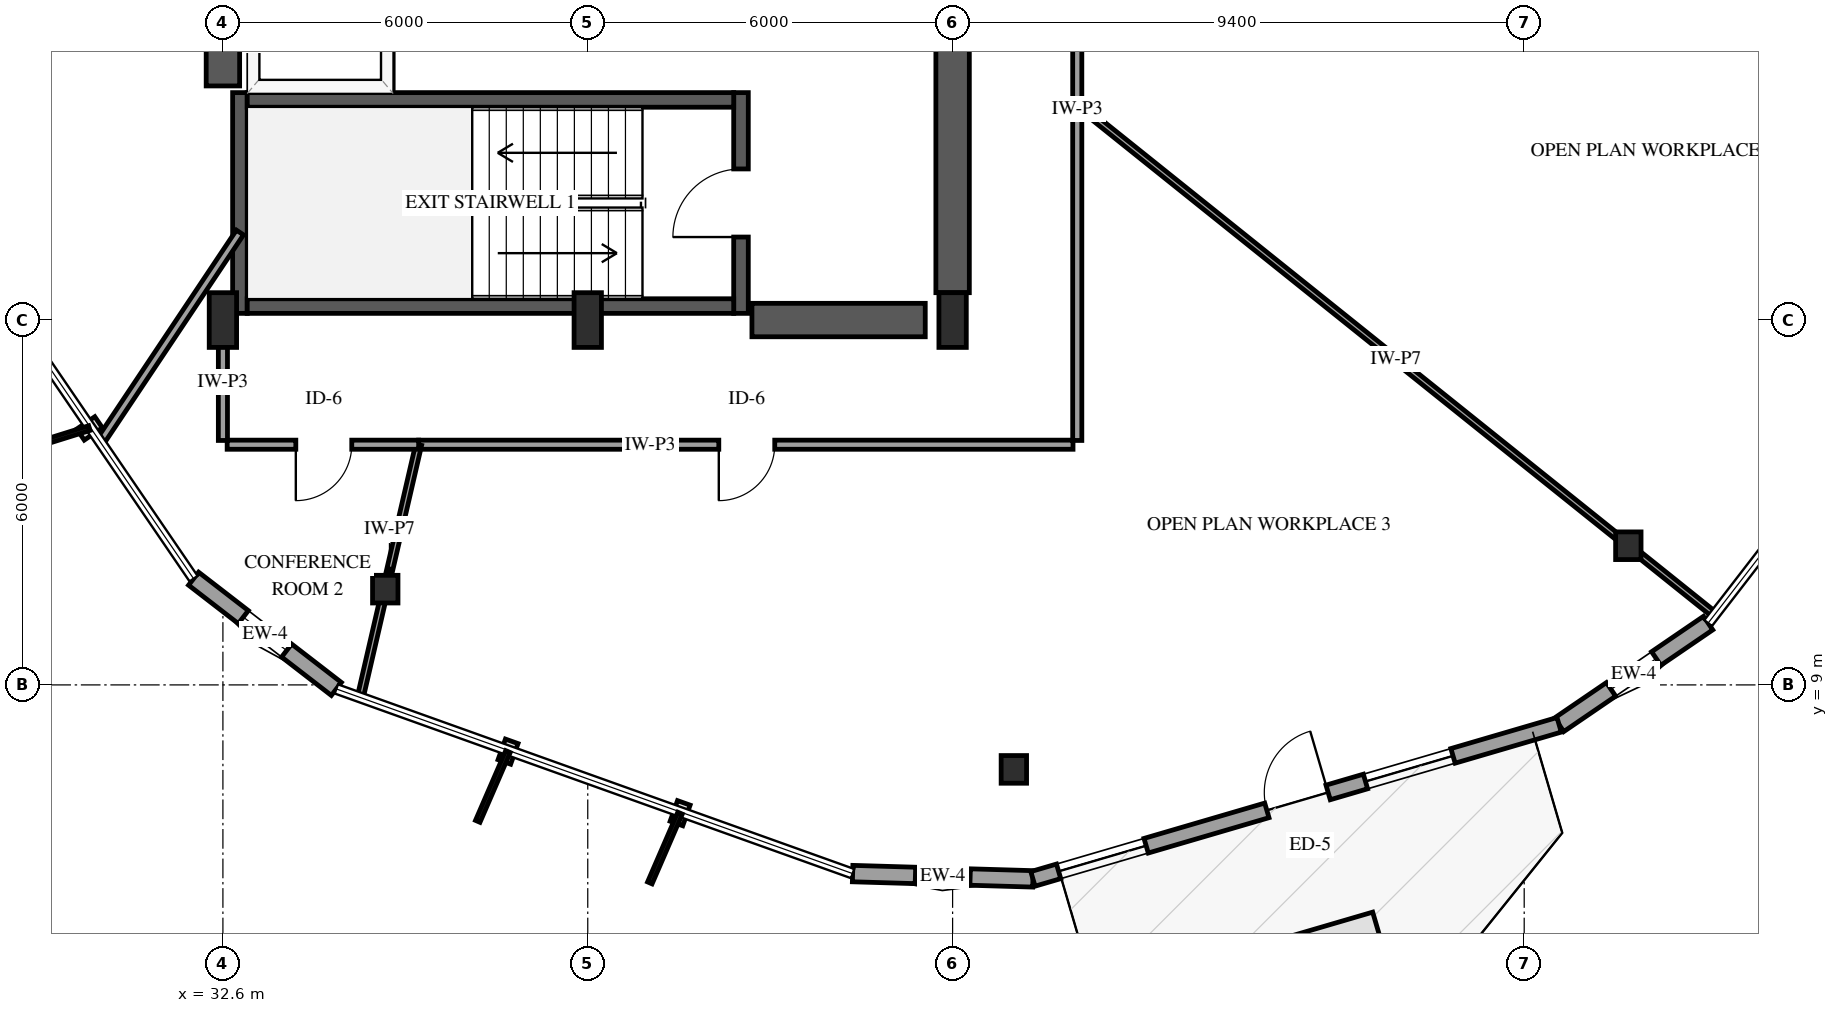
"""IFC4 building model, lengths in metres.
Left out: names, types, materials, properties, quantities, classifications, styles, units other than length and angle.
Written with IfcOpenShell. Run it as: python <this file> out.ifc"""

import sys

from ifc_helpers import new_model, si_unit, direction, frame, frame_2d, origin, origin_2d, place, context, subcontext, project, spatial, rectangle, i_section, extrude, element, fill, save


model = new_model("IFC4")
c1 = context("Model", 3, precision=1e-05, world=origin(), true_north=direction((0.0, 1.0)))
c2 = subcontext(c1, "Body", "Model", "MODEL_VIEW")
j1 = project(units=[si_unit("LENGTHUNIT", "METRE"), si_unit("PLANEANGLEUNIT", "RADIAN")], contexts=[c1])
p1 = place(None, origin())
s1 = spatial("IfcSite", under=j1, at=p1, CompositionType="ELEMENT")
p2 = place(p1, origin())
s2 = spatial("IfcBuilding", under=s1, at=p2, CompositionType="ELEMENT")
p3 = place(p2, frame((0.0, 0.0, 91.3)))
s3 = spatial("IfcBuildingStorey", under=s2, at=p3, CompositionType="ELEMENT", Elevation=91.3)
p4 = place(p3, frame((32.88, 15.11, 0.0), z_axis=(0.0, 0.0, 1.0), x_axis=(0.0, 1.0, 0.0)))
e1 = element("IfcWall", 1, at=p4, inside=s3, PredefinedType="SHEAR", context=c2, shape_type="SweptSolid", body=[
    extrude(rectangle(XDim=3.63, YDim=0.24, at=frame_2d((1.815, 0.0))), origin(), (0.0, 0.0, 1.0), 3.9),
])
p5 = place(p3, frame((41.12, 15.11, 0.0), z_axis=(0.0, 0.0, 1.0), x_axis=(0.0, 1.0, 0.0)))
e2 = element("IfcWall", 2, at=p5, inside=s3, PredefinedType="SHEAR", context=c2, shape_type="SweptSolid", body=[
    extrude(rectangle(XDim=3.63, YDim=0.24, at=frame_2d((1.815, 0.0))), origin(), (0.0, 0.0, 1.0), 3.9),
])
p6 = place(p5, frame((1.255, 0.0, 0.0)))
e3 = element("IfcOpeningElement", 3, at=p6, cuts=e2, PredefinedType="OPENING", context=c2, shape_type="SweptSolid", body=[
    extrude(rectangle(XDim=1.12, YDim=2.15, at=frame_2d((0.56, 1.075))), frame((0.0, 0.13, 0.0), z_axis=(0.0, -1.0, 0.0), x_axis=(1.0, 0.0, 0.0)), (0.0, 0.0, 1.0), 0.26),
])
for number, where, z_axis, x_axis in (
    (4, (33.0, 15.23, 0.0), (0.0, 0.0, 1.0), (1.0, 0.0, 0.0)),
    (5, (33.0, 18.62, 0.0), (0.0, 0.0, 1.0), (1.0, 0.0, 0.0)),
):
    element("IfcWall", number, at=place(p3, frame(where, z_axis=z_axis, x_axis=x_axis)), inside=s3, PredefinedType="SHEAR", context=c2, shape_type="SweptSolid", body=[
        extrude(rectangle(XDim=8.0, YDim=0.24, at=frame_2d((4.0, 0.0))), origin(), (0.0, 0.0, 1.0), 3.9),
    ])
p7 = place(p3, frame((32.6, 18.85, 0.0), z_axis=(0.0, 0.0, 1.0), x_axis=(0.0, 1.0, 0.0)))
e6 = element("IfcWall", 6, at=p7, inside=s3, PredefinedType="SHEAR", context=c2, shape_type="SweptSolid", body=[
    extrude(rectangle(XDim=12.3, YDim=0.55, at=frame_2d((6.15, 0.0))), origin(), (0.0, 0.0, 1.0), 3.9),
])
p8 = place(p3, frame((41.3, 15.0, 0.0), z_axis=(0.0, 0.0, 1.0), x_axis=(1.0, 0.0, 0.0)))
e7 = element("IfcWall", 7, at=p8, inside=s3, PredefinedType="SHEAR", context=c2, shape_type="SweptSolid", body=[
    extrude(rectangle(XDim=2.85, YDim=0.55, at=frame_2d((1.425, 0.0))), origin(), (0.0, 0.0, 1.0), 3.9),
])
p9 = place(p3, frame((44.6, 15.45, 0.0), z_axis=(0.0, 0.0, 1.0), x_axis=(0.0, 1.0, 0.0)))
e8 = element("IfcWall", 8, at=p9, inside=s3, PredefinedType="SHEAR", context=c2, shape_type="SweptSolid", body=[
    extrude(rectangle(XDim=6.35, YDim=0.55, at=frame_2d((3.175, 0.0))), origin(), (0.0, 0.0, 1.0), 3.9),
])
for number, where, z_axis, x_axis in (
    (9, (32.6, 15.0, 0.0), (0.0, 0.0, 1.0), (1.0, 0.0, 0.0)),
    (10, (38.6, 15.0, 0.0), (0.0, 0.0, 1.0), (1.0, 0.0, 0.0)),
    (11, (44.6, 15.0, 0.0), (0.0, 0.0, 1.0), (1.0, 0.0, 0.0)),
):
    element("IfcColumn", number, at=place(p3, frame(where, z_axis=z_axis, x_axis=x_axis)), inside=s3, PredefinedType="PILASTER", context=c2, shape_type="SweptSolid", body=[
        extrude(rectangle(XDim=0.45, YDim=0.9, at=origin_2d()), origin(), (0.0, 0.0, 1.0), 3.9),
    ])
for number, where, z_axis, x_axis in (
    (12, (35.27, 10.575, 0.0), (0.0, 0.0, 1.0), (1.0, 0.0, 0.0)),
    (13, (45.607, 7.611, 0.0), (0.0, 0.0, 1.0), (1.0, 0.0, 0.0)),
    (14, (55.712, 11.289, 0.0), (0.0, 0.0, 1.0), (1.0, 0.0, 0.0)),
):
    element("IfcColumn", number, at=place(p3, frame(where, z_axis=z_axis, x_axis=x_axis)), inside=s3, PredefinedType="COLUMN", context=c2, shape_type="SweptSolid", body=[
        extrude(i_section(OverallWidth=0.418, OverallDepth=0.455, WebThickness=0.042, FlangeThickness=0.068, FilletRadius=0.038, at=origin_2d()), origin(), (0.0, 0.0, 1.0), 3.9),
    ])
p10 = place(p3, frame((32.118, 10.747, 0.0), z_axis=(0.0, 0.0, 1.0), x_axis=(0.791417099737, -0.611276512098, 0.0)))
e15 = element("IfcWall", 15, at=p10, inside=s3, PredefinedType="SOLIDWALL", context=c2, shape_type="SweptSolid", body=[
    extrude(rectangle(XDim=2.967, YDim=0.27, at=frame_2d((1.483, 0.0))), origin(), (0.0, 0.0, 1.0), 2.979),
])
p11 = place(p10, frame((1.033, 0.0, 0.75)))
e16 = element("IfcOpeningElement", 16, at=p11, cuts=e15, PredefinedType="OPENING", context=c2, shape_type="SweptSolid", body=[
    extrude(rectangle(XDim=0.9, YDim=1.5, at=frame_2d((0.45, 0.75))), frame((0.0, 0.145, 0.0), z_axis=(0.0, -1.0, 0.0), x_axis=(1.0, 0.0, 0.0)), (0.0, 0.0, 1.0), 0.29),
])
p12 = place(p3, frame((42.956, 5.897, 0.0), z_axis=(0.0, 0.0, 1.0), x_axis=(0.999570736723, -0.029297479193, 0.0)))
e17 = element("IfcWall", 17, at=p12, inside=s3, PredefinedType="SOLIDWALL", context=c2, shape_type="SweptSolid", body=[
    extrude(rectangle(XDim=2.967, YDim=0.27, at=frame_2d((1.483, 0.0))), origin(), (0.0, 0.0, 1.0), 2.979),
])
p13 = place(p12, frame((1.033, 0.0, 0.75)))
e18 = element("IfcOpeningElement", 18, at=p13, cuts=e17, PredefinedType="OPENING", context=c2, shape_type="SweptSolid", body=[
    extrude(rectangle(XDim=0.9, YDim=1.5, at=frame_2d((0.45, 0.75))), frame((0.0, 0.145, 0.0), z_axis=(0.0, -1.0, 0.0), x_axis=(1.0, 0.0, 0.0)), (0.0, 0.0, 1.0), 0.29),
])
p14 = place(p3, frame((54.575, 8.344, 0.0), z_axis=(0.0, 0.0, 1.0), x_axis=(0.825884174717, 0.563839808768, 0.0)))
e19 = element("IfcWall", 19, at=p14, inside=s3, PredefinedType="SOLIDWALL", context=c2, shape_type="SweptSolid", body=[
    extrude(rectangle(XDim=2.967, YDim=0.27, at=frame_2d((1.483, 0.0))), origin(), (0.0, 0.0, 1.0), 2.979),
])
p15 = place(p14, frame((1.033, 0.0, 0.75)))
e20 = element("IfcOpeningElement", 20, at=p15, cuts=e19, PredefinedType="OPENING", context=c2, shape_type="SweptSolid", body=[
    extrude(rectangle(XDim=0.9, YDim=1.5, at=frame_2d((0.45, 0.75))), frame((0.0, 0.145, 0.0), z_axis=(0.0, -1.0, 0.0), x_axis=(1.0, 0.0, 0.0)), (0.0, 0.0, 1.0), 0.29),
])
p16 = place(p3, frame((45.921, 5.81, 0.0), z_axis=(0.0, 0.0, 1.0), x_axis=(0.959709272815, 0.28099486058, 0.0)))
e21 = element("IfcWall", 21, at=p16, inside=s3, PredefinedType="SOLIDWALL", context=c2, shape_type="SweptSolid", body=[
    extrude(rectangle(XDim=9.017, YDim=0.25, at=frame_2d((4.508, 0.0))), origin(), (0.0, 0.0, 1.0), 2.979),
])
p17 = place(p16, frame((4.008, 0.0, 0.0)))
e22 = element("IfcOpeningElement", 22, at=p17, cuts=e21, PredefinedType="OPENING", context=c2, shape_type="SweptSolid", body=[
    extrude(rectangle(XDim=1.05, YDim=2.15, at=frame_2d((0.525, 1.075))), frame((0.0, 0.135, 0.0), z_axis=(0.0, -1.0, 0.0), x_axis=(1.0, 0.0, 0.0)), (0.0, 0.0, 1.0), 0.27),
])
p18 = place(p16, frame((0.44, 0.0, 0.72)))
e23 = element("IfcOpeningElement", 23, at=p18, cuts=e21, PredefinedType="OPENING", context=c2, shape_type="SweptSolid", body=[
    extrude(rectangle(XDim=1.5, YDim=1.7, at=frame_2d((0.75, 0.85))), frame((0.0, 0.135, 0.0), z_axis=(0.0, -1.0, 0.0), x_axis=(1.0, 0.0, 0.0)), (0.0, 0.0, 1.0), 0.27),
])
p19 = place(p16, frame((5.698, 0.0, 0.72)))
e24 = element("IfcOpeningElement", 24, at=p19, cuts=e21, PredefinedType="OPENING", context=c2, shape_type="SweptSolid", body=[
    extrude(rectangle(XDim=1.5, YDim=1.7, at=frame_2d((0.75, 0.85))), frame((0.0, 0.135, 0.0), z_axis=(0.0, -1.0, 0.0), x_axis=(1.0, 0.0, 0.0)), (0.0, 0.0, 1.0), 0.27),
])
p20 = place(p3, frame((35.3, 18.79, 0.0), z_axis=(0.0, 0.0, 1.0), x_axis=(0.0, 1.0, 0.0)))
e25 = element("IfcWall", 25, at=p20, inside=s3, PredefinedType="SOLIDWALL", context=c2, shape_type="SweptSolid", body=[
    extrude(rectangle(XDim=2.55, YDim=0.2, at=frame_2d((1.275, 0.0))), origin(), (0.0, 0.0, 1.0), 3.6),
])
p21 = place(p20, frame((0.725, 0.0, 0.0)))
e26 = element("IfcOpeningElement", 26, at=p21, cuts=e25, PredefinedType="OPENING", context=c2, shape_type="SweptSolid", body=[
    extrude(rectangle(XDim=1.1, YDim=2.15, at=frame_2d((0.55, 1.075))), frame((0.0, 0.11, 0.0), z_axis=(0.0, -1.0, 0.0), x_axis=(1.0, 0.0, 0.0)), (0.0, 0.0, 1.0), 0.22),
])
p22 = place(p3, frame((46.65, 18.55, 0.0), z_axis=(0.0, 0.0, 1.0), x_axis=(0.780396792297, -0.625284612455, 0.0)))
e27 = element("IfcWall", 27, at=p22, inside=s3, PredefinedType="PARTITIONING", context=c2, shape_type="SweptSolid", body=[
    extrude(rectangle(XDim=13.429, YDim=0.1, at=frame_2d((6.714, 0.0))), origin(), (0.0, 0.0, 1.0), 3.6),
])
p23 = place(p3, frame((46.58, 12.95, 0.0), z_axis=(0.0, 0.0, 1.0), x_axis=(-1.0, 0.0, 0.0)))
e28 = element("IfcWall", 28, at=p23, inside=s3, PredefinedType="PARTITIONING", context=c2, shape_type="SweptSolid", body=[
    extrude(rectangle(XDim=10.761, YDim=0.15, at=frame_2d((5.38, 0.0))), origin(), (0.0, 0.0, 1.0), 3.6),
])
p24 = place(p23, frame((4.905, 0.0, 0.0)))
e29 = element("IfcOpeningElement", 29, at=p24, cuts=e28, PredefinedType="OPENING", context=c2, shape_type="SweptSolid", body=[
    extrude(rectangle(XDim=0.92, YDim=2.12, at=frame_2d((0.46, 1.06))), frame((0.0, 0.085, 0.0), z_axis=(0.0, -1.0, 0.0), x_axis=(1.0, 0.0, 0.0)), (0.0, 0.0, 1.0), 0.17),
])
p25 = place(p3, frame((46.65, 18.55, 0.0), z_axis=(0.0, 0.0, 1.0), x_axis=(0.0, -1.0, 0.0)))
e30 = element("IfcWall", 30, at=p25, inside=s3, PredefinedType="PARTITIONING", context=c2, shape_type="SweptSolid", body=[
    extrude(rectangle(XDim=5.53, YDim=0.15, at=frame_2d((2.765, 0.0))), origin(), (0.0, 0.0, 1.0), 3.6),
])
p26 = place(p3, frame((46.65, 23.93, 0.0), z_axis=(0.0, 0.0, 1.0), x_axis=(0.0, -1.0, 0.0)))
e31 = element("IfcWall", 31, at=p26, inside=s3, PredefinedType="PARTITIONING", context=c2, shape_type="SweptSolid", body=[
    extrude(rectangle(XDim=5.38, YDim=0.15, at=frame_2d((2.69, 0.0))), origin(), (0.0, 0.0, 1.0), 3.6),
])
p27 = place(p3, frame((35.819, 12.95, 0.0), z_axis=(0.0, 0.0, 1.0), x_axis=(-0.225277389067, -0.974294666913, 0.0)))
e32 = element("IfcWall", 32, at=p27, inside=s3, PredefinedType="PARTITIONING", context=c2, shape_type="SweptSolid", body=[
    extrude(rectangle(XDim=4.267, YDim=0.1, at=frame_2d((2.133, 0.0))), origin(), (0.0, 0.0, 1.0), 2.895),
])
p28 = place(p3, frame((32.88, 16.44, 0.0), z_axis=(0.0, 0.0, 1.0), x_axis=(-0.555516811992, -0.83150530461, 0.0)))
e33 = element("IfcWall", 33, at=p28, inside=s3, PredefinedType="PARTITIONING", context=c2, shape_type="SweptSolid", body=[
    extrude(rectangle(XDim=4.138, YDim=0.14, at=frame_2d((2.069, 0.0))), origin(), (0.0, 0.0, 1.0), 3.6),
])
p29 = place(p3, frame((35.819, 12.95, 0.0), z_axis=(0.0, 0.0, 1.0), x_axis=(-1.0, 0.0, 0.0)))
e34 = element("IfcWall", 34, at=p29, inside=s3, PredefinedType="PARTITIONING", context=c2, shape_type="SweptSolid", body=[
    extrude(rectangle(XDim=3.149, YDim=0.15, at=frame_2d((1.575, 0.0))), origin(), (0.0, 0.0, 1.0), 3.6),
])
p30 = place(p29, frame((1.1, 0.0, 0.0)))
e35 = element("IfcOpeningElement", 35, at=p30, cuts=e34, PredefinedType="OPENING", context=c2, shape_type="SweptSolid", body=[
    extrude(rectangle(XDim=0.92, YDim=2.12, at=frame_2d((0.46, 1.06))), frame((0.0, 0.085, 0.0), z_axis=(0.0, -1.0, 0.0), x_axis=(1.0, 0.0, 0.0)), (0.0, 0.0, 1.0), 0.17),
])
p31 = place(p3, frame((32.6, 13.02, 0.0), z_axis=(0.0, 0.0, 1.0), x_axis=(0.0, 1.0, 0.0)))
e36 = element("IfcWall", 36, at=p31, inside=s3, PredefinedType="PARTITIONING", context=c2, shape_type="SweptSolid", body=[
    extrude(rectangle(XDim=1.91, YDim=0.15, at=frame_2d((0.955, 0.0))), origin(), (0.0, 0.0, 1.0), 3.6),
])
p32 = place(p11, origin())
e37 = element("IfcWindow", 37, at=p32, inside=s3, PartitioningType="SINGLE_PANEL", PredefinedType="WINDOW", context=c2, shape_type="SweptSolid", body=[
    extrude(rectangle(XDim=0.9, YDim=1.5, at=frame_2d((0.45, 0.75))), frame((0.0, 0.03, 0.0), z_axis=(0.0, -1.0, 0.0), x_axis=(1.0, 0.0, 0.0)), (0.0, 0.0, 1.0), 0.06),
])
fill(e16, e37)
p33 = place(p13, origin())
e38 = element("IfcWindow", 38, at=p33, inside=s3, PartitioningType="SINGLE_PANEL", PredefinedType="WINDOW", context=c2, shape_type="SweptSolid", body=[
    extrude(rectangle(XDim=0.9, YDim=1.5, at=frame_2d((0.45, 0.75))), frame((0.0, 0.03, 0.0), z_axis=(0.0, -1.0, 0.0), x_axis=(1.0, 0.0, 0.0)), (0.0, 0.0, 1.0), 0.06),
])
fill(e18, e38)
p34 = place(p15, origin())
e39 = element("IfcWindow", 39, at=p34, inside=s3, PartitioningType="SINGLE_PANEL", PredefinedType="WINDOW", context=c2, shape_type="SweptSolid", body=[
    extrude(rectangle(XDim=0.9, YDim=1.5, at=frame_2d((0.45, 0.75))), frame((0.0, 0.03, 0.0), z_axis=(0.0, -1.0, 0.0), x_axis=(1.0, 0.0, 0.0)), (0.0, 0.0, 1.0), 0.06),
])
fill(e20, e39)
p35 = place(p17, origin())
e40 = element("IfcDoor", 40, at=p35, inside=s3, OperationType="SINGLE_SWING_RIGHT", PredefinedType="DOOR", context=c2, shape_type="SweptSolid", body=[
    extrude(rectangle(XDim=1.05, YDim=2.15, at=frame_2d((0.525, 1.075))), frame((0.0, 0.025, 0.0), z_axis=(0.0, -1.0, 0.0), x_axis=(1.0, 0.0, 0.0)), (0.0, 0.0, 1.0), 0.05),
])
fill(e22, e40)
p36 = place(p18, origin())
e41 = element("IfcWindow", 41, at=p36, inside=s3, PartitioningType="SINGLE_PANEL", PredefinedType="WINDOW", context=c2, shape_type="SweptSolid", body=[
    extrude(rectangle(XDim=1.5, YDim=1.7, at=frame_2d((0.75, 0.85))), frame((0.0, 0.03, 0.0), z_axis=(0.0, -1.0, 0.0), x_axis=(1.0, 0.0, 0.0)), (0.0, 0.0, 1.0), 0.06),
])
fill(e23, e41)
p37 = place(p19, origin())
e42 = element("IfcWindow", 42, at=p37, inside=s3, PartitioningType="SINGLE_PANEL", PredefinedType="WINDOW", context=c2, shape_type="SweptSolid", body=[
    extrude(rectangle(XDim=1.5, YDim=1.7, at=frame_2d((0.75, 0.85))), frame((0.0, 0.03, 0.0), z_axis=(0.0, -1.0, 0.0), x_axis=(1.0, 0.0, 0.0)), (0.0, 0.0, 1.0), 0.06),
])
fill(e24, e42)
p38 = place(p6, origin())
e43 = element("IfcDoor", 43, at=p38, inside=s3, OperationType="SINGLE_SWING_LEFT", PredefinedType="DOOR", context=c2, shape_type="SweptSolid", body=[
    extrude(rectangle(XDim=1.12, YDim=2.15, at=frame_2d((0.56, 1.075))), frame((0.0, 0.025, 0.0), z_axis=(0.0, -1.0, 0.0), x_axis=(1.0, 0.0, 0.0)), (0.0, 0.0, 1.0), 0.05),
])
fill(e3, e43)
p39 = place(p24, origin())
e44 = element("IfcDoor", 44, at=p39, inside=s3, OperationType="SINGLE_SWING_RIGHT", PredefinedType="DOOR", context=c2, shape_type="SweptSolid", body=[
    extrude(rectangle(XDim=0.92, YDim=2.12, at=frame_2d((0.46, 1.06))), frame((0.0, 0.025, 0.0), z_axis=(0.0, -1.0, 0.0), x_axis=(1.0, 0.0, 0.0)), (0.0, 0.0, 1.0), 0.05),
])
fill(e29, e44)
p40 = place(p30, origin())
e45 = element("IfcDoor", 45, at=p40, inside=s3, OperationType="SINGLE_SWING_RIGHT", PredefinedType="DOOR", context=c2, shape_type="SweptSolid", body=[
    extrude(rectangle(XDim=0.92, YDim=2.12, at=frame_2d((0.46, 1.06))), frame((0.0, 0.025, 0.0), z_axis=(0.0, -1.0, 0.0), x_axis=(1.0, 0.0, 0.0)), (0.0, 0.0, 1.0), 0.05),
])
fill(e35, e45)
save(model, sys.argv[1])
